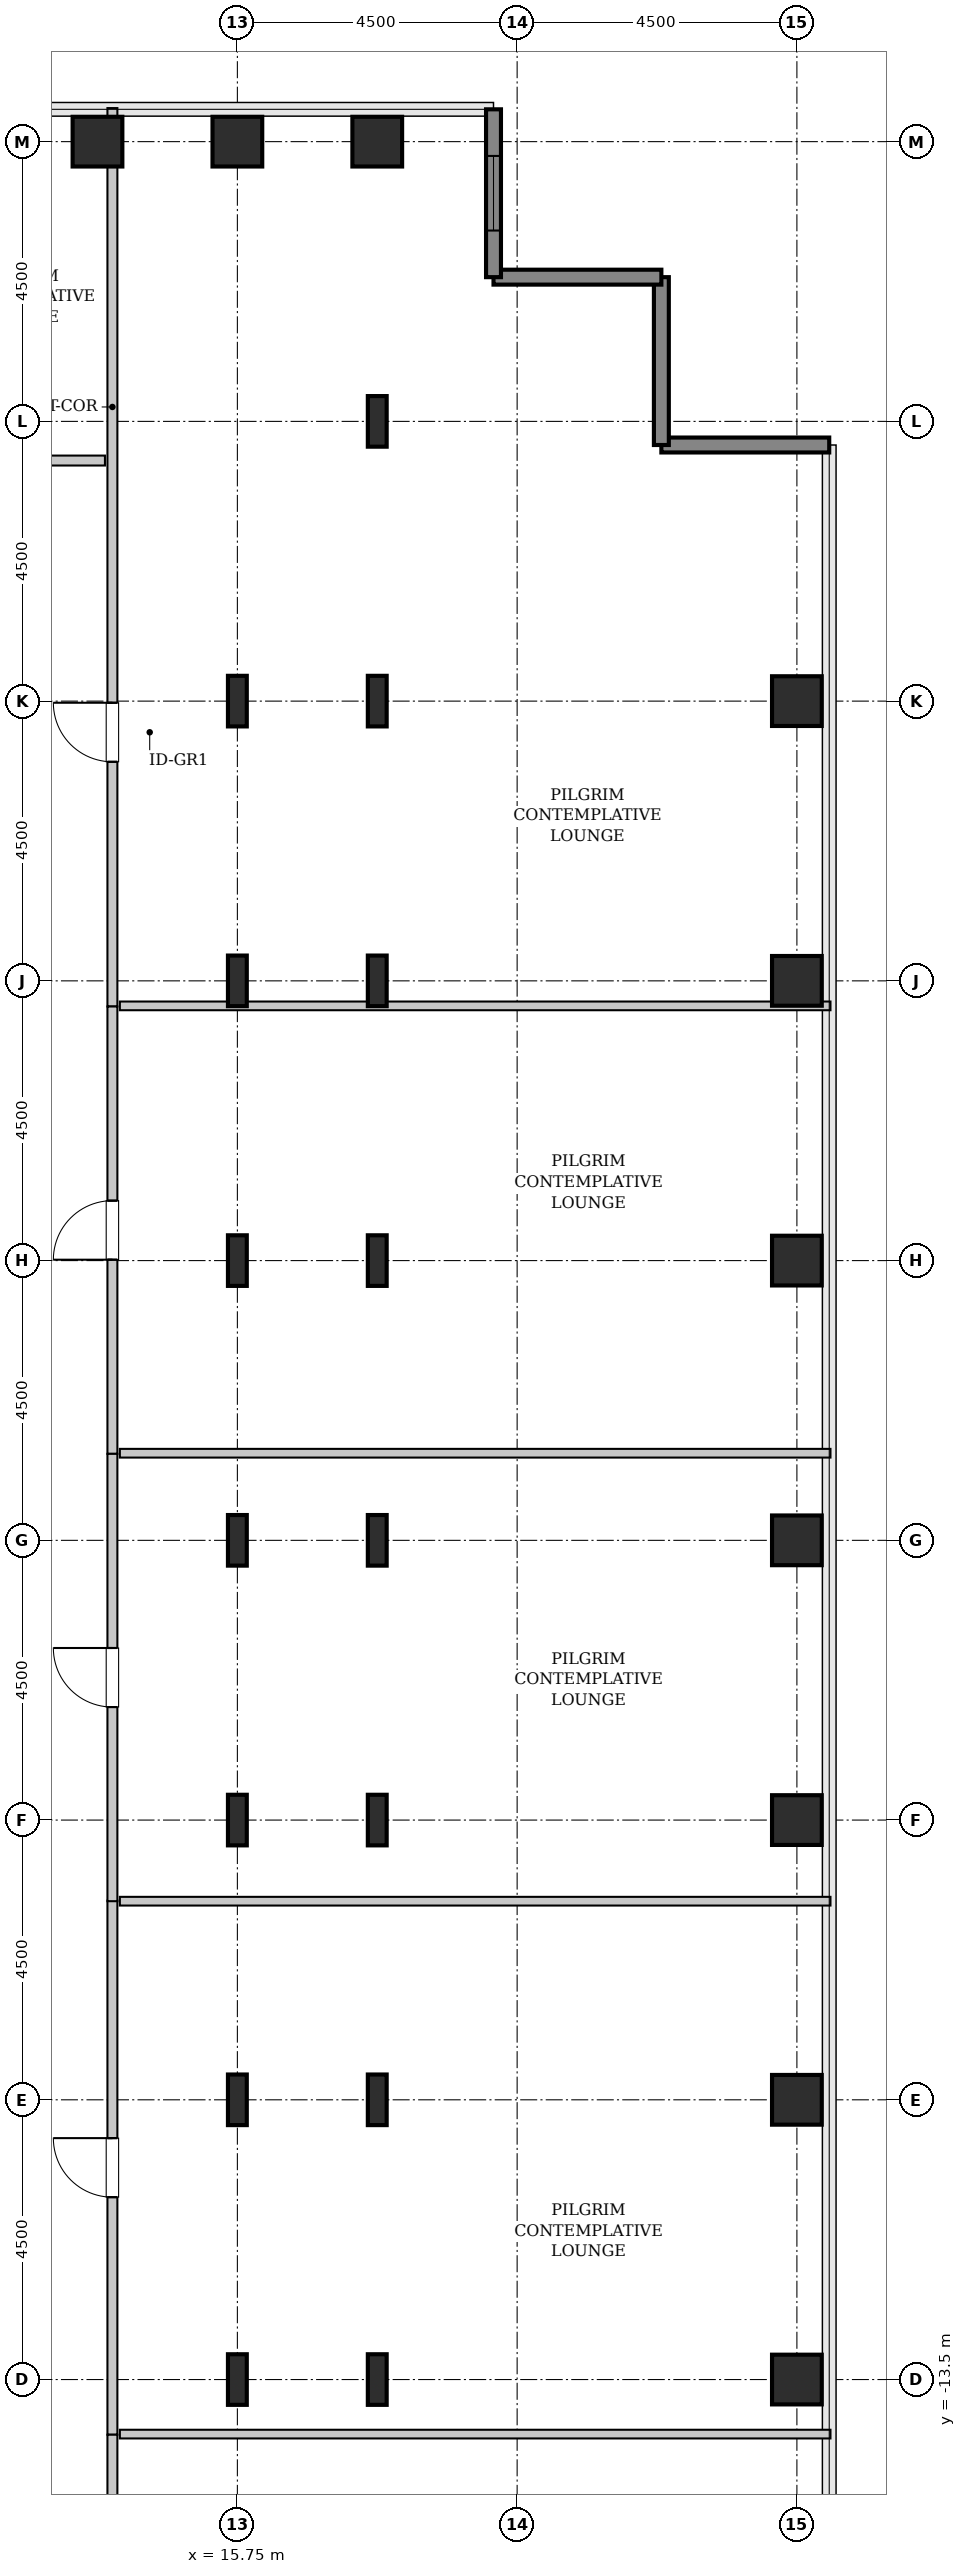
"""IFC4 building model, lengths in metres.
Left out: names, types, materials, properties, quantities, classifications, styles, units other than length and angle.
Written with IfcOpenShell. Run it as: python <this file> out.ifc"""

import sys

from ifc_helpers import new_model, si_unit, direction, frame, frame_2d, origin, origin_2d, place, context, subcontext, project, spatial, rectangle, hollow_rectangle, i_section, extrude, source, transform, mapped, element, fill, save


model = new_model("IFC4")
c1 = context("Model", 3, precision=1e-05, world=origin(), true_north=direction((0.0, 1.0)))
c2 = subcontext(c1, "Body", "Model", "MODEL_VIEW")
j1 = project(units=[si_unit("LENGTHUNIT", "METRE"), si_unit("PLANEANGLEUNIT", "RADIAN")], contexts=[c1])
p1 = place(None, origin())
s1 = spatial("IfcSite", under=j1, at=p1, CompositionType="ELEMENT")
p2 = place(p1, origin())
s2 = spatial("IfcBuilding", under=s1, at=p2, CompositionType="ELEMENT")
p3 = place(p2, frame((0.0, 0.0, 190.6)))
s3 = spatial("IfcBuildingStorey", under=s2, at=p3, CompositionType="ELEMENT", Elevation=190.6)
m1 = source(origin(), c2, "Body", "SweptSolid", [
    extrude(hollow_rectangle(XDim=0.8, YDim=0.8, WallThickness=0.04, InnerFilletRadius=0.04, OuterFilletRadius=0.08, at=origin_2d()), origin(), (0.0, 0.0, 1.0), 3.8),
])
p4 = place(p3, frame((13.5, 22.5, 0.0), z_axis=(0.0, 0.0, 1.0), x_axis=(1.0, 0.0, 0.0)))
e1 = element("IfcColumn", 1, at=p4, inside=s3, PredefinedType="COLUMN", context=c2, shape_type="MappedRepresentation", body=[
    mapped(m1, transform((0.0, 0.0, 0.0), x_axis=(1.0, 0.0, 0.0), y_axis=(0.0, 1.0, 0.0), z_axis=(0.0, 0.0, 1.0), scale=1.0)),
])
m2 = source(origin(), c2, "Body", "SweptSolid", [
    extrude(i_section(OverallWidth=0.303, OverallDepth=0.814, WebThickness=0.021, FlangeThickness=0.04, FilletRadius=0.03, at=origin_2d()), origin(), (0.0, 0.0, 1.0), 3.8),
])
for number, where, z_axis, x_axis in (
    (2, (15.75, -13.5, 0.0), (0.0, 0.0, 1.0), (1.0, 0.0, 0.0)),
    (3, (15.75, -9.0, 0.0), (0.0, 0.0, 1.0), (1.0, 0.0, 0.0)),
    (4, (15.75, -4.5, 0.0), (0.0, 0.0, 1.0), (1.0, 0.0, 0.0)),
    (5, (15.75, 0.0, 0.0), (0.0, 0.0, 1.0), (1.0, 0.0, 0.0)),
    (6, (15.75, 4.5, 0.0), (0.0, 0.0, 1.0), (1.0, 0.0, 0.0)),
    (7, (15.75, 9.0, 0.0), (0.0, 0.0, 1.0), (1.0, 0.0, 0.0)),
    (8, (15.75, 13.5, 0.0), (0.0, 0.0, 1.0), (1.0, 0.0, 0.0)),
):
    element("IfcColumn", number, at=place(p3, frame(where, z_axis=z_axis, x_axis=x_axis)), inside=s3, PredefinedType="COLUMN", context=c2, shape_type="MappedRepresentation", body=[
        mapped(m2, transform((0.0, 0.0, 0.0), x_axis=(1.0, 0.0, 0.0), y_axis=(0.0, 1.0, 0.0), z_axis=(0.0, 0.0, 1.0), scale=1.0)),
    ])
p5 = place(p3, frame((15.75, 22.5, 0.0), z_axis=(0.0, 0.0, 1.0), x_axis=(1.0, 0.0, 0.0)))
e9 = element("IfcColumn", 9, at=p5, inside=s3, PredefinedType="COLUMN", context=c2, shape_type="MappedRepresentation", body=[
    mapped(m1, transform((0.0, 0.0, 0.0), x_axis=(1.0, 0.0, 0.0), y_axis=(0.0, 1.0, 0.0), z_axis=(0.0, 0.0, 1.0), scale=1.0)),
])
for number, where, z_axis, x_axis in (
    (10, (18.0, -13.5, 0.0), (0.0, 0.0, 1.0), (1.0, 0.0, 0.0)),
    (11, (18.0, -9.0, 0.0), (0.0, 0.0, 1.0), (1.0, 0.0, 0.0)),
    (12, (18.0, -4.5, 0.0), (0.0, 0.0, 1.0), (1.0, 0.0, 0.0)),
    (13, (18.0, 0.0, 0.0), (0.0, 0.0, 1.0), (1.0, 0.0, 0.0)),
    (14, (18.0, 4.5, 0.0), (0.0, 0.0, 1.0), (1.0, 0.0, 0.0)),
    (15, (18.0, 9.0, 0.0), (0.0, 0.0, 1.0), (1.0, 0.0, 0.0)),
    (16, (18.0, 13.5, 0.0), (0.0, 0.0, 1.0), (1.0, 0.0, 0.0)),
    (17, (18.0, 18.0, 0.0), (0.0, 0.0, 1.0), (1.0, 0.0, 0.0)),
):
    element("IfcColumn", number, at=place(p3, frame(where, z_axis=z_axis, x_axis=x_axis)), inside=s3, PredefinedType="COLUMN", context=c2, shape_type="MappedRepresentation", body=[
        mapped(m2, transform((0.0, 0.0, 0.0), x_axis=(1.0, 0.0, 0.0), y_axis=(0.0, 1.0, 0.0), z_axis=(0.0, 0.0, 1.0), scale=1.0)),
    ])
for number, where, z_axis, x_axis in (
    (18, (18.0, 22.5, 0.0), (0.0, 0.0, 1.0), (1.0, 0.0, 0.0)),
    (19, (24.75, -13.5, 0.0), (0.0, 0.0, 1.0), (1.0, 0.0, 0.0)),
    (20, (24.75, -9.0, 0.0), (0.0, 0.0, 1.0), (1.0, 0.0, 0.0)),
    (21, (24.75, -4.5, 0.0), (0.0, 0.0, 1.0), (1.0, 0.0, 0.0)),
    (22, (24.75, 0.0, 0.0), (0.0, 0.0, 1.0), (1.0, 0.0, 0.0)),
    (23, (24.75, 4.5, 0.0), (0.0, 0.0, 1.0), (1.0, 0.0, 0.0)),
    (24, (24.75, 9.0, 0.0), (0.0, 0.0, 1.0), (1.0, 0.0, 0.0)),
    (25, (24.75, 13.5, 0.0), (0.0, 0.0, 1.0), (1.0, 0.0, 0.0)),
):
    element("IfcColumn", number, at=place(p3, frame(where, z_axis=z_axis, x_axis=x_axis)), inside=s3, PredefinedType="COLUMN", context=c2, shape_type="MappedRepresentation", body=[
        mapped(m1, transform((0.0, 0.0, 0.0), x_axis=(1.0, 0.0, 0.0), y_axis=(0.0, 1.0, 0.0), z_axis=(0.0, 0.0, 1.0), scale=1.0)),
    ])
m3 = source(origin(), c2, "Body", "SweptSolid", [
    extrude(rectangle(XDim=2.7, YDim=0.24, at=frame_2d((1.35, 0.0))), origin(), (0.0, 0.0, 1.0), 3.55),
])
for number, where, z_axis, x_axis in (
    (26, (25.27, 17.62, 0.0), (0.0, 0.0, 1.0), (-1.0, 0.0, 0.0)),
    (27, (22.57, 17.62, 0.0), (0.0, 0.0, 1.0), (0.0, 1.0, 0.0)),
    (28, (22.57, 20.32, 0.0), (0.0, 0.0, 1.0), (-1.0, 0.0, 0.0)),
):
    element("IfcWall", number, at=place(p3, frame(where, z_axis=z_axis, x_axis=x_axis)), inside=s3, PredefinedType="SHEAR", context=c2, shape_type="MappedRepresentation", body=[
        mapped(m3, transform((0.0, 0.0, 0.0), x_axis=(1.0, 0.0, 0.0), y_axis=(0.0, 1.0, 0.0), z_axis=(0.0, 0.0, 1.0), scale=1.0)),
    ])
p6 = place(p3, frame((19.87, 20.32, 0.0), z_axis=(0.0, 0.0, 1.0), x_axis=(0.0, 1.0, 0.0)))
e29 = element("IfcWall", 29, at=p6, inside=s3, PredefinedType="SHEAR", context=c2, shape_type="MappedRepresentation", body=[
    mapped(m3, transform((0.0, 0.0, 0.0), x_axis=(1.0, 0.0, 0.0), y_axis=(0.0, 1.0, 0.0), z_axis=(0.0, 0.0, 1.0), scale=1.0)),
])
p7 = place(p6, frame((0.75, 0.0, 0.85)))
e30 = element("IfcOpeningElement", 30, at=p7, cuts=e29, PredefinedType="OPENING", context=c2, shape_type="SweptSolid", body=[
    extrude(rectangle(XDim=1.2, YDim=1.8, at=frame_2d((0.6, 0.9))), frame((0.0, 0.13, 0.0), z_axis=(0.0, -1.0, 0.0), x_axis=(1.0, 0.0, 0.0)), (0.0, 0.0, 1.0), 0.26),
])
m4 = source(origin(), c2, "Body", "SweptSolid", [
    extrude(rectangle(XDim=8.593, YDim=0.16, at=frame_2d((4.296, 0.0))), origin(), (0.0, 0.0, 1.0), 3.535),
])
p8 = place(p3, frame((13.74, -14.387, 0.0), z_axis=(0.0, 0.0, 1.0), x_axis=(0.0, 1.0, 0.0)))
e31 = element("IfcWall", 31, at=p8, inside=s3, PredefinedType="PARTITIONING", context=c2, shape_type="MappedRepresentation", body=[
    mapped(m4, transform((0.0, 0.0, 0.0), x_axis=(1.0, 0.0, 0.0), y_axis=(0.0, 1.0, 0.0), z_axis=(0.0, 0.0, 1.0), scale=1.0)),
])
p9 = place(p8, frame((3.821, 0.0, 0.0)))
e32 = element("IfcOpeningElement", 32, at=p9, cuts=e31, PredefinedType="OPENING", context=c2, shape_type="SweptSolid", body=[
    extrude(rectangle(XDim=0.95, YDim=2.1, at=frame_2d((0.475, 1.05))), frame((0.0, 0.09, 0.0), z_axis=(0.0, -1.0, 0.0), x_axis=(1.0, 0.0, 0.0)), (0.0, 0.0, 1.0), 0.18),
])
m5 = source(origin(), c2, "Body", "SweptSolid", [
    extrude(rectangle(XDim=11.43, YDim=0.14, at=frame_2d((5.715, 0.0))), origin(), (0.0, 0.0, 1.0), 3.535),
])
for number, where, z_axis, x_axis in (
    (33, (13.86, -14.377, 0.0), (0.0, 0.0, 1.0), (1.0, 0.0, 0.0)),
    (34, (13.86, -5.805, 0.0), (0.0, 0.0, 1.0), (1.0, 0.0, 0.0)),
):
    element("IfcWall", number, at=place(p3, frame(where, z_axis=z_axis, x_axis=x_axis)), inside=s3, PredefinedType="PARTITIONING", context=c2, shape_type="MappedRepresentation", body=[
        mapped(m5, transform((0.0, 0.0, 0.0), x_axis=(1.0, 0.0, 0.0), y_axis=(0.0, 1.0, 0.0), z_axis=(0.0, 0.0, 1.0), scale=1.0)),
    ])
m6 = source(origin(), c2, "Body", "SweptSolid", [
    extrude(rectangle(XDim=8.653, YDim=0.16, at=frame_2d((4.326, 0.0))), origin(), (0.0, 0.0, 1.0), 3.535),
])
p10 = place(p3, frame((13.74, -23.04, 0.0), z_axis=(0.0, 0.0, 1.0), x_axis=(0.0, 1.0, 0.0)))
e35 = element("IfcWall", 35, at=p10, inside=s3, PredefinedType="PARTITIONING", context=c2, shape_type="MappedRepresentation", body=[
    mapped(m6, transform((0.0, 0.0, 0.0), x_axis=(1.0, 0.0, 0.0), y_axis=(0.0, 1.0, 0.0), z_axis=(0.0, 0.0, 1.0), scale=1.0)),
])
p11 = place(p10, frame((6.666, 0.0, 0.0)))
e36 = element("IfcOpeningElement", 36, at=p11, cuts=e35, PredefinedType="OPENING", context=c2, shape_type="SweptSolid", body=[
    extrude(rectangle(XDim=0.95, YDim=2.1, at=frame_2d((0.475, 1.05))), frame((0.0, 0.09, 0.0), z_axis=(0.0, -1.0, 0.0), x_axis=(1.0, 0.0, 0.0)), (0.0, 0.0, 1.0), 0.18),
])
m7 = source(origin(), c2, "Body", "SweptSolid", [
    extrude(rectangle(XDim=14.453, YDim=0.16, at=frame_2d((7.226, 0.0))), origin(), (0.0, 0.0, 1.0), 3.535),
])
p12 = place(p3, frame((13.74, 8.587, 0.0), z_axis=(0.0, 0.0, 1.0), x_axis=(0.0, 1.0, 0.0)))
e37 = element("IfcWall", 37, at=p12, inside=s3, PredefinedType="PARTITIONING", context=c2, shape_type="MappedRepresentation", body=[
    mapped(m7, transform((0.0, 0.0, 0.0), x_axis=(1.0, 0.0, 0.0), y_axis=(0.0, 1.0, 0.0), z_axis=(0.0, 0.0, 1.0), scale=1.0)),
])
p13 = place(p12, frame((3.936, 0.0, 0.0)))
e38 = element("IfcOpeningElement", 38, at=p13, cuts=e37, PredefinedType="OPENING", context=c2, shape_type="SweptSolid", body=[
    extrude(rectangle(XDim=0.95, YDim=2.1, at=frame_2d((0.475, 1.05))), frame((0.0, 0.09, 0.0), z_axis=(0.0, -1.0, 0.0), x_axis=(1.0, 0.0, 0.0)), (0.0, 0.0, 1.0), 0.18),
])
m8 = source(origin(), c2, "Body", "SweptSolid", [
    extrude(rectangle(XDim=11.43, YDim=0.14, at=frame_2d((5.715, 0.0))), origin(), (0.0, 0.0, 1.0), 2.875),
])
p14 = place(p3, frame((13.86, 8.597, 0.0), z_axis=(0.0, 0.0, 1.0), x_axis=(1.0, 0.0, 0.0)))
e39 = element("IfcWall", 39, at=p14, inside=s3, PredefinedType="PARTITIONING", context=c2, shape_type="MappedRepresentation", body=[
    mapped(m8, transform((0.0, 0.0, 0.0), x_axis=(1.0, 0.0, 0.0), y_axis=(0.0, 1.0, 0.0), z_axis=(0.0, 0.0, 1.0), scale=1.0)),
])
m9 = source(origin(), c2, "Body", "SweptSolid", [
    extrude(rectangle(XDim=7.196, YDim=0.16, at=frame_2d((3.598, 0.0))), origin(), (0.0, 0.0, 1.0), 3.535),
])
p15 = place(p3, frame((13.74, 1.391, 0.0), z_axis=(0.0, 0.0, 1.0), x_axis=(0.0, 1.0, 0.0)))
e40 = element("IfcWall", 40, at=p15, inside=s3, PredefinedType="PARTITIONING", context=c2, shape_type="MappedRepresentation", body=[
    mapped(m9, transform((0.0, 0.0, 0.0), x_axis=(1.0, 0.0, 0.0), y_axis=(0.0, 1.0, 0.0), z_axis=(0.0, 0.0, 1.0), scale=1.0)),
])
p16 = place(p15, frame((3.123, 0.0, 0.0)))
e41 = element("IfcOpeningElement", 41, at=p16, cuts=e40, PredefinedType="OPENING", context=c2, shape_type="SweptSolid", body=[
    extrude(rectangle(XDim=0.95, YDim=2.1, at=frame_2d((0.475, 1.05))), frame((0.0, 0.09, 0.0), z_axis=(0.0, -1.0, 0.0), x_axis=(1.0, 0.0, 0.0)), (0.0, 0.0, 1.0), 0.18),
])
p17 = place(p3, frame((13.86, 1.401, 0.0), z_axis=(0.0, 0.0, 1.0), x_axis=(1.0, 0.0, 0.0)))
e42 = element("IfcWall", 42, at=p17, inside=s3, PredefinedType="PARTITIONING", context=c2, shape_type="MappedRepresentation", body=[
    mapped(m5, transform((0.0, 0.0, 0.0), x_axis=(1.0, 0.0, 0.0), y_axis=(0.0, 1.0, 0.0), z_axis=(0.0, 0.0, 1.0), scale=1.0)),
])
m10 = source(origin(), c2, "Body", "SweptSolid", [
    extrude(rectangle(XDim=7.196, YDim=0.16, at=frame_2d((3.598, 0.0))), origin(), (0.0, 0.0, 1.0), 3.535),
])
p18 = place(p3, frame((13.74, -5.805, 0.0), z_axis=(0.0, 0.0, 1.0), x_axis=(0.0, 1.0, 0.0)))
e43 = element("IfcWall", 43, at=p18, inside=s3, PredefinedType="PARTITIONING", context=c2, shape_type="MappedRepresentation", body=[
    mapped(m10, transform((0.0, 0.0, 0.0), x_axis=(1.0, 0.0, 0.0), y_axis=(0.0, 1.0, 0.0), z_axis=(0.0, 0.0, 1.0), scale=1.0)),
])
p19 = place(p18, frame((3.123, 0.0, 0.0)))
e44 = element("IfcOpeningElement", 44, at=p19, cuts=e43, PredefinedType="OPENING", context=c2, shape_type="SweptSolid", body=[
    extrude(rectangle(XDim=0.95, YDim=2.1, at=frame_2d((0.475, 1.05))), frame((0.0, 0.09, 0.0), z_axis=(0.0, -1.0, 0.0), x_axis=(1.0, 0.0, 0.0)), (0.0, 0.0, 1.0), 0.18),
])
m11 = source(origin(), c2, "Body", "SweptSolid", [
    extrude(rectangle(XDim=5.225, YDim=0.16, at=frame_2d((2.613, 0.0))), origin(), (0.0, 0.0, 1.0), 3.535),
])
p20 = place(p3, frame((8.395, 17.37, 0.0), z_axis=(0.0, 0.0, 1.0), x_axis=(1.0, 0.0, 0.0)))
e45 = element("IfcWall", 45, at=p20, inside=s3, PredefinedType="PARTITIONING", context=c2, shape_type="MappedRepresentation", body=[
    mapped(m11, transform((0.0, 0.0, 0.0), x_axis=(1.0, 0.0, 0.0), y_axis=(0.0, 1.0, 0.0), z_axis=(0.0, 0.0, 1.0), scale=1.0)),
])
p21 = place(p20, frame((1.543, 0.0, 0.0)))
e46 = element("IfcOpeningElement", 46, at=p21, cuts=e45, PredefinedType="OPENING", context=c2, shape_type="SweptSolid", body=[
    extrude(rectangle(XDim=0.95, YDim=2.1, at=frame_2d((0.475, 1.05))), frame((0.0, 0.09, 0.0), z_axis=(0.0, -1.0, 0.0), x_axis=(1.0, 0.0, 0.0)), (0.0, 0.0, 1.0), 0.18),
])
m12 = source(origin(), c2, "Body", "SweptSolid", [
    extrude(rectangle(XDim=1.2, YDim=1.8, at=frame_2d((0.6, 0.9))), frame((0.0, 0.03, 0.0), z_axis=(0.0, -1.0, 0.0), x_axis=(1.0, 0.0, 0.0)), (0.0, 0.0, 1.0), 0.06),
])
p22 = place(p7, origin())
e47 = element("IfcWindow", 47, at=p22, inside=s3, PartitioningType="SINGLE_PANEL", PredefinedType="WINDOW", context=c2, shape_type="MappedRepresentation", body=[
    mapped(m12, transform((0.0, 0.0, 0.0), x_axis=(1.0, 0.0, 0.0), y_axis=(0.0, 1.0, 0.0), z_axis=(0.0, 0.0, 1.0), scale=1.0)),
])
fill(e30, e47)
m13 = source(origin(), c2, "Body", "SweptSolid", [
    extrude(rectangle(XDim=0.95, YDim=2.1, at=frame_2d((0.475, 1.05))), frame((0.0, 0.025, 0.0), z_axis=(0.0, -1.0, 0.0), x_axis=(1.0, 0.0, 0.0)), (0.0, 0.0, 1.0), 0.05),
])
p23 = place(p9, origin())
e48 = element("IfcDoor", 48, at=p23, inside=s3, OperationType="SINGLE_SWING_RIGHT", PredefinedType="DOOR", context=c2, shape_type="MappedRepresentation", body=[
    mapped(m13, transform((0.0, 0.0, 0.0), x_axis=(1.0, 0.0, 0.0), y_axis=(0.0, 1.0, 0.0), z_axis=(0.0, 0.0, 1.0), scale=1.0)),
])
fill(e32, e48)
p24 = place(p13, origin())
e49 = element("IfcDoor", 49, at=p24, inside=s3, OperationType="SINGLE_SWING_RIGHT", PredefinedType="DOOR", context=c2, shape_type="MappedRepresentation", body=[
    mapped(m13, transform((0.0, 0.0, 0.0), x_axis=(1.0, 0.0, 0.0), y_axis=(0.0, 1.0, 0.0), z_axis=(0.0, 0.0, 1.0), scale=1.0)),
])
fill(e38, e49)
p25 = place(p16, origin())
e50 = element("IfcDoor", 50, at=p25, inside=s3, OperationType="SINGLE_SWING_LEFT", PredefinedType="DOOR", context=c2, shape_type="MappedRepresentation", body=[
    mapped(m13, transform((0.0, 0.0, 0.0), x_axis=(1.0, 0.0, 0.0), y_axis=(0.0, 1.0, 0.0), z_axis=(0.0, 0.0, 1.0), scale=1.0)),
])
fill(e41, e50)
p26 = place(p19, origin())
e51 = element("IfcDoor", 51, at=p26, inside=s3, OperationType="SINGLE_SWING_RIGHT", PredefinedType="DOOR", context=c2, shape_type="MappedRepresentation", body=[
    mapped(m13, transform((0.0, 0.0, 0.0), x_axis=(1.0, 0.0, 0.0), y_axis=(0.0, 1.0, 0.0), z_axis=(0.0, 0.0, 1.0), scale=1.0)),
])
fill(e44, e51)
save(model, sys.argv[1])
